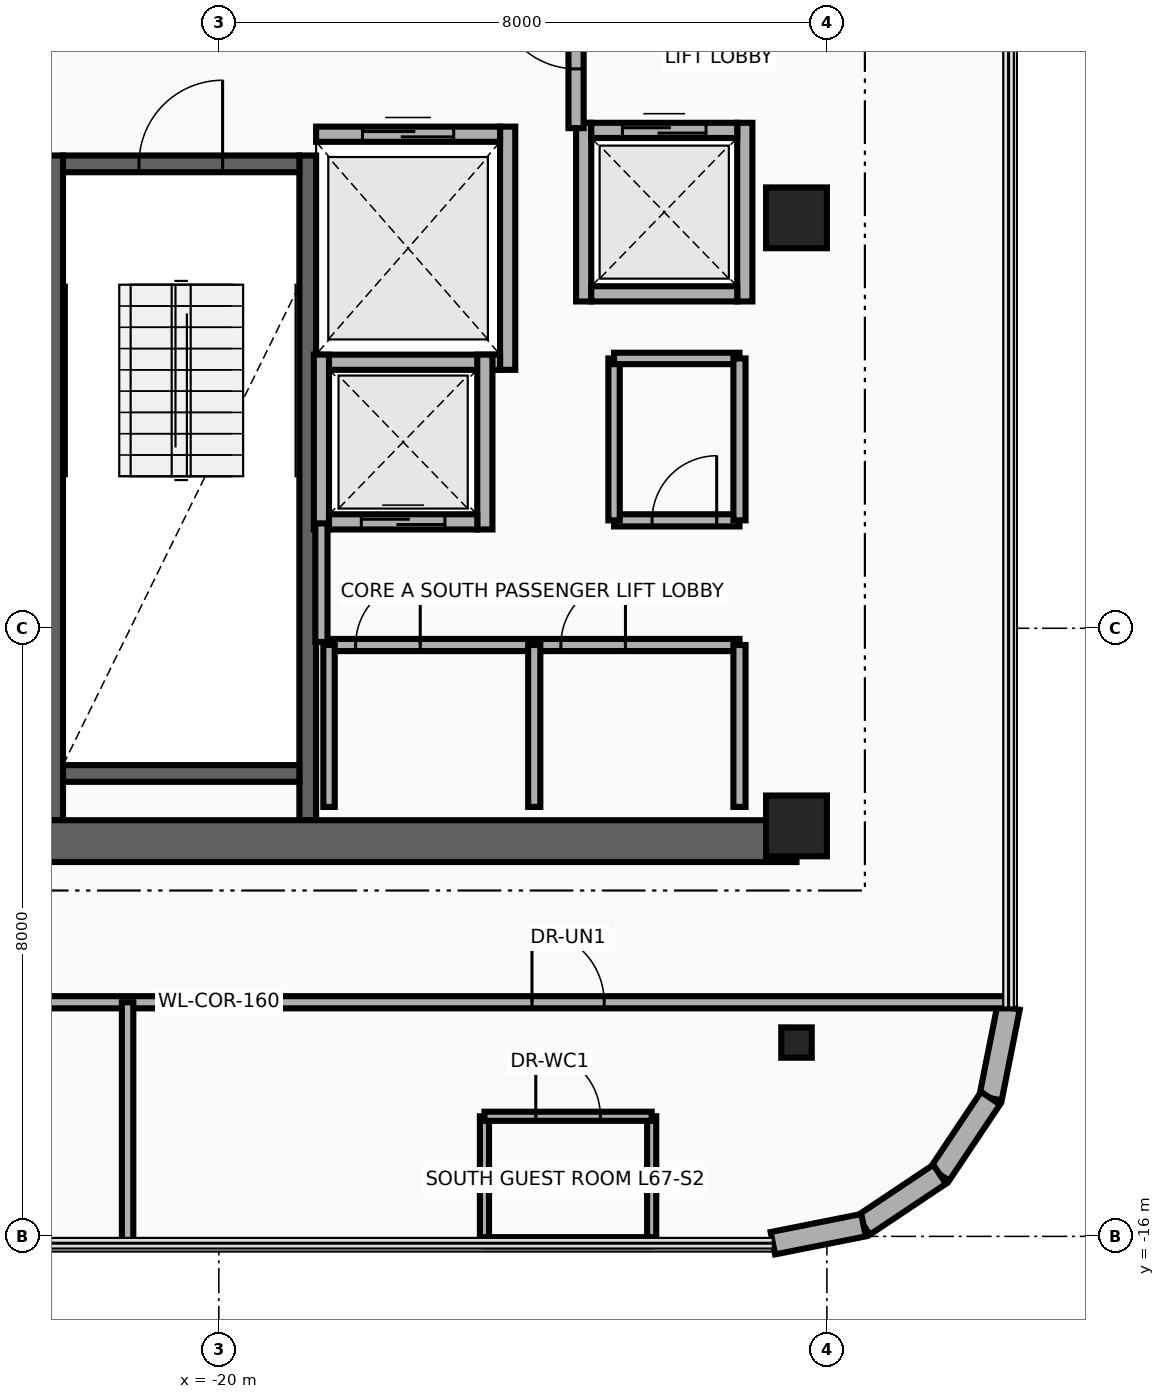
"""IFC4 building model, lengths in metres.
Left out: names, types, materials, properties, quantities, classifications, styles, units other than length and angle.
Written with IfcOpenShell. Run it as: python <this file> out.ifc"""

import sys

from ifc_helpers import new_model, si_unit, direction, frame, frame_2d, origin, origin_2d, place, context, subcontext, project, spatial, rectangle, i_section, extrude, source, transform, mapped, element, fill, save


model = new_model("IFC4")
c1 = context("Model", 3, precision=1e-05, world=origin(), true_north=direction((0.0, 1.0)))
c2 = subcontext(c1, "Body", "Model", "MODEL_VIEW")
j1 = project(units=[si_unit("LENGTHUNIT", "METRE"), si_unit("PLANEANGLEUNIT", "RADIAN")], contexts=[c1])
p1 = place(None, origin())
s1 = spatial("IfcSite", under=j1, at=p1, CompositionType="ELEMENT")
p2 = place(p1, origin())
s2 = spatial("IfcBuilding", under=s1, at=p2, CompositionType="ELEMENT")
p3 = place(p2, frame((0.0, 0.0, 258.0)))
s3 = spatial("IfcBuildingStorey", under=s2, at=p3, CompositionType="ELEMENT", Elevation=258.0)
for number, where, z_axis, x_axis in (
    (1, (-22.16, -10.525, 0.0), (0.0, 0.0, 1.0), (0.0, 1.0, 0.0)),
    (2, (-18.83, -10.525, 0.0), (0.0, 0.0, 1.0), (0.0, 1.0, 0.0)),
):
    element("IfcWall", number, at=place(p3, frame(where, z_axis=z_axis, x_axis=x_axis)), inside=s3, PredefinedType="SHEAR", context=c2, shape_type="SweptSolid", body=[
        extrude(rectangle(XDim=8.745, YDim=0.22, at=frame_2d((4.373, 0.0))), origin(), (0.0, 0.0, 1.0), 3.26),
    ])
p4 = place(p3, frame((-22.05, -9.91, 0.0), z_axis=(0.0, 0.0, 1.0), x_axis=(1.0, 0.0, 0.0)))
e3 = element("IfcWall", 3, at=p4, inside=s3, PredefinedType="SHEAR", context=c2, shape_type="SweptSolid", body=[
    extrude(rectangle(XDim=3.11, YDim=0.22, at=frame_2d((1.555, 0.0))), origin(), (0.0, 0.0, 1.0), 3.26),
])
p5 = place(p3, frame((-22.05, -1.89, 0.0), z_axis=(0.0, 0.0, 1.0), x_axis=(1.0, 0.0, 0.0)))
e4 = element("IfcWall", 4, at=p5, inside=s3, PredefinedType="SHEAR", context=c2, shape_type="SweptSolid", body=[
    extrude(rectangle(XDim=3.11, YDim=0.22, at=frame_2d((1.555, 0.0))), origin(), (0.0, 0.0, 1.0), 3.26),
])
p6 = place(p5, frame((1.0, 0.0, 0.0)))
e5 = element("IfcOpeningElement", 5, at=p6, cuts=e4, PredefinedType="OPENING", context=c2, shape_type="SweptSolid", body=[
    extrude(rectangle(XDim=1.1, YDim=2.15, at=frame_2d((0.55, 1.075))), frame((0.0, 0.125, 0.0), z_axis=(0.0, -1.0, 0.0), x_axis=(1.0, 0.0, 0.0)), (0.0, 0.0, 1.0), 0.25),
])
p7 = place(p3, frame((-22.65, -10.8, 0.0), z_axis=(0.0, 0.0, 1.0), x_axis=(1.0, 0.0, 0.0)))
e6 = element("IfcWall", 6, at=p7, inside=s3, PredefinedType="SHEAR", context=c2, shape_type="SweptSolid", body=[
    extrude(rectangle(XDim=10.25, YDim=0.55, at=frame_2d((5.125, 0.0))), origin(), (0.0, 0.0, 1.0), 3.26),
])
m1 = source(origin(), c2, "Body", "SweptSolid", [
    extrude(rectangle(XDim=0.8, YDim=0.8, at=origin_2d()), origin(), (0.0, 0.0, 1.0), 3.5),
])
for number, where, z_axis, x_axis in (
    (7, (-12.4, -10.6, 0.0), (0.0, 0.0, 1.0), (1.0, 0.0, 0.0)),
    (8, (-12.4, -2.6, 0.0), (0.0, 0.0, 1.0), (1.0, 0.0, 0.0)),
):
    element("IfcColumn", number, at=place(p3, frame(where, z_axis=z_axis, x_axis=x_axis)), inside=s3, PredefinedType="COLUMN", context=c2, shape_type="MappedRepresentation", body=[
        mapped(m1, transform((0.0, 0.0, 0.0), x_axis=(1.0, 0.0, 0.0), y_axis=(0.0, 1.0, 0.0), z_axis=(0.0, 0.0, 1.0), scale=1.0)),
    ])
m2 = source(origin(), c2, "Body", "SweptSolid", [
    extrude(i_section(OverallWidth=0.401, OverallDepth=0.399, WebThickness=0.025, FlangeThickness=0.04, at=origin_2d()), origin(), (0.0, 0.0, 1.0), 3.5),
])
p8 = place(p3, frame((-12.4, -13.45, 0.0), z_axis=(0.0, 0.0, 1.0), x_axis=(1.0, 0.0, 0.0)))
e9 = element("IfcColumn", 9, at=p8, inside=s3, PredefinedType="COLUMN", context=c2, shape_type="MappedRepresentation", body=[
    mapped(m2, transform((0.0, 0.0, 0.0), x_axis=(1.0, 0.0, 0.0), y_axis=(0.0, 1.0, 0.0), z_axis=(0.0, 0.0, 1.0), scale=1.0)),
])
p9 = place(p3, frame((-9.61, -12.989, 0.0), z_axis=(0.0, 0.0, 1.0), x_axis=(-0.194996050505, -0.980804027463, 0.0)))
e10 = element("IfcWall", 10, at=p9, inside=s3, PredefinedType="SOLIDWALL", context=c2, shape_type="SweptSolid", body=[
    extrude(rectangle(XDim=1.216, YDim=0.3, at=frame_2d((0.608, 0.0))), origin(), (0.0, 0.0, 1.0), 3.26),
])
for number, where, z_axis, x_axis in (
    (11, (-9.847, -14.182, 0.0), (0.0, 0.0, 1.0), (-0.556, -0.831, 0.0)),
    (12, (-10.517, -15.183, 0.0), (0.0, 0.0, 1.0), (-0.831, -0.556, 0.0)),
):
    element("IfcWall", number, at=place(p3, frame(where, z_axis=z_axis, x_axis=x_axis)), inside=s3, PredefinedType="SOLIDWALL", context=c2, shape_type="SweptSolid", body=[
        extrude(rectangle(XDim=1.205, YDim=0.3, at=frame_2d((0.603, 0.0))), origin(), (0.0, 0.0, 1.0), 3.26),
    ])
p10 = place(p3, frame((-11.518, -15.853, 0.0), z_axis=(0.0, 0.0, 1.0), x_axis=(-0.980765602568, -0.195189223115, 0.0)))
e13 = element("IfcWall", 13, at=p10, inside=s3, PredefinedType="SOLIDWALL", context=c2, shape_type="SweptSolid", body=[
    extrude(rectangle(XDim=1.216, YDim=0.3, at=frame_2d((0.608, 0.0))), origin(), (0.0, 0.0, 1.0), 3.26),
])
p11 = place(p3, frame((-16.2, -4.6, 0.0), z_axis=(0.0, 0.0, 1.0), x_axis=(0.0, 1.0, 0.0)))
e14 = element("IfcWall", 14, at=p11, inside=s3, PredefinedType="MOVABLE", context=c2, shape_type="SweptSolid", body=[
    extrude(rectangle(XDim=3.2, YDim=0.2, at=frame_2d((1.6, 0.0))), origin(), (0.0, 0.0, 1.0), 3.26),
])
p12 = place(p3, frame((-18.72, -4.5, 0.0), z_axis=(0.0, 0.0, 1.0), x_axis=(1.0, 0.0, 0.0)))
e15 = element("IfcWall", 15, at=p12, inside=s3, PredefinedType="MOVABLE", context=c2, shape_type="SweptSolid", body=[
    extrude(rectangle(XDim=2.42, YDim=0.2, at=frame_2d((1.21, 0.0))), origin(), (0.0, 0.0, 1.0), 3.26),
])
p13 = place(p3, frame((-18.72, -1.5, 0.0), z_axis=(0.0, 0.0, 1.0), x_axis=(1.0, 0.0, 0.0)))
e16 = element("IfcWall", 16, at=p13, inside=s3, PredefinedType="MOVABLE", context=c2, shape_type="SweptSolid", body=[
    extrude(rectangle(XDim=2.42, YDim=0.2, at=frame_2d((1.21, 0.0))), origin(), (0.0, 0.0, 1.0), 3.26),
])
p14 = place(p13, frame((0.61, 0.0, 0.0)))
e17 = element("IfcOpeningElement", 17, at=p14, cuts=e16, PredefinedType="OPENING", context=c2, shape_type="SweptSolid", body=[
    extrude(rectangle(XDim=1.2, YDim=2.1, at=frame_2d((0.6, 1.05))), frame((0.0, 0.115, 0.0), z_axis=(0.0, -1.0, 0.0), x_axis=(1.0, 0.0, 0.0)), (0.0, 0.0, 1.0), 0.23),
])
for number, where, z_axis, x_axis in (
    (18, (-18.65, -6.7, 0.0), (0.0, 0.0, 1.0), (0.0, 1.0, 0.0)),
    (19, (-16.5, -6.7, 0.0), (0.0, 0.0, 1.0), (0.0, 1.0, 0.0)),
):
    element("IfcWall", number, at=place(p3, frame(where, z_axis=z_axis, x_axis=x_axis)), inside=s3, PredefinedType="MOVABLE", context=c2, shape_type="SweptSolid", body=[
        extrude(rectangle(XDim=2.3, YDim=0.2, at=frame_2d((1.15, 0.0))), origin(), (0.0, 0.0, 1.0), 3.26),
    ])
p15 = place(p3, frame((-18.55, -6.6, 0.0), z_axis=(0.0, 0.0, 1.0), x_axis=(1.0, 0.0, 0.0)))
e20 = element("IfcWall", 20, at=p15, inside=s3, PredefinedType="MOVABLE", context=c2, shape_type="SweptSolid", body=[
    extrude(rectangle(XDim=1.95, YDim=0.2, at=frame_2d((0.975, 0.0))), origin(), (0.0, 0.0, 1.0), 3.26),
])
p16 = place(p15, frame((0.425, 0.0, 0.0)))
e21 = element("IfcOpeningElement", 21, at=p16, cuts=e20, PredefinedType="OPENING", context=c2, shape_type="SweptSolid", body=[
    extrude(rectangle(XDim=1.1, YDim=2.1, at=frame_2d((0.55, 1.05))), frame((0.0, 0.115, 0.0), z_axis=(0.0, -1.0, 0.0), x_axis=(1.0, 0.0, 0.0)), (0.0, 0.0, 1.0), 0.23),
])
for number, where, z_axis, x_axis in (
    (22, (-15.2, -3.7, 0.0), (0.0, 0.0, 1.0), (0.0, 1.0, 0.0)),
    (23, (-13.08, -3.7, 0.0), (0.0, 0.0, 1.0), (0.0, 1.0, 0.0)),
):
    element("IfcWall", number, at=place(p3, frame(where, z_axis=z_axis, x_axis=x_axis)), inside=s3, PredefinedType="MOVABLE", context=c2, shape_type="SweptSolid", body=[
        extrude(rectangle(XDim=2.35, YDim=0.2, at=frame_2d((1.175, 0.0))), origin(), (0.0, 0.0, 1.0), 3.26),
    ])
p17 = place(p3, frame((-15.1, -3.6, 0.0), z_axis=(0.0, 0.0, 1.0), x_axis=(1.0, 0.0, 0.0)))
e24 = element("IfcWall", 24, at=p17, inside=s3, PredefinedType="MOVABLE", context=c2, shape_type="SweptSolid", body=[
    extrude(rectangle(XDim=1.92, YDim=0.2, at=frame_2d((0.96, 0.0))), origin(), (0.0, 0.0, 1.0), 3.26),
])
p18 = place(p3, frame((-15.1, -1.45, 0.0), z_axis=(0.0, 0.0, 1.0), x_axis=(1.0, 0.0, 0.0)))
e25 = element("IfcWall", 25, at=p18, inside=s3, PredefinedType="MOVABLE", context=c2, shape_type="SweptSolid", body=[
    extrude(rectangle(XDim=1.92, YDim=0.2, at=frame_2d((0.96, 0.0))), origin(), (0.0, 0.0, 1.0), 3.26),
])
p19 = place(p18, frame((0.41, 0.0, 0.0)))
e26 = element("IfcOpeningElement", 26, at=p19, cuts=e25, PredefinedType="OPENING", context=c2, shape_type="SweptSolid", body=[
    extrude(rectangle(XDim=1.1, YDim=2.1, at=frame_2d((0.55, 1.05))), frame((0.0, 0.115, 0.0), z_axis=(0.0, -1.0, 0.0), x_axis=(1.0, 0.0, 0.0)), (0.0, 0.0, 1.0), 0.23),
])
p20 = place(p3, frame((-15.3, -1.42, 0.0), z_axis=(0.0, 0.0, 1.0), x_axis=(0.0, 1.0, 0.0)))
e27 = element("IfcWall", 27, at=p20, inside=s3, PredefinedType="PARTITIONING", context=c2, shape_type="SweptSolid", body=[
    extrude(rectangle(XDim=2.67, YDim=0.2, at=frame_2d((1.335, 0.0))), origin(), (0.0, 0.0, 1.0), 3.26),
])
p21 = place(p20, frame((0.78, 0.0, 0.0)))
e28 = element("IfcOpeningElement", 28, at=p21, cuts=e27, PredefinedType="OPENING", context=c2, shape_type="SweptSolid", body=[
    extrude(rectangle(XDim=1.05, YDim=2.15, at=frame_2d((0.525, 1.075))), frame((0.0, 0.115, 0.0), z_axis=(0.0, -1.0, 0.0), x_axis=(1.0, 0.0, 0.0)), (0.0, 0.0, 1.0), 0.23),
])
p22 = place(p3, frame((-18.65, -8.18, 0.0), z_axis=(0.0, 0.0, 1.0), x_axis=(0.0, 1.0, 0.0)))
e29 = element("IfcWall", 29, at=p22, inside=s3, PredefinedType="PARTITIONING", context=c2, shape_type="SweptSolid", body=[
    extrude(rectangle(XDim=1.56, YDim=0.16, at=frame_2d((0.78, 0.0))), origin(), (0.0, 0.0, 1.0), 3.26),
])
p23 = place(p3, frame((-18.55, -8.22, 0.0), z_axis=(0.0, 0.0, 1.0), x_axis=(1.0, 0.0, 0.0)))
e30 = element("IfcWall", 30, at=p23, inside=s3, PredefinedType="PARTITIONING", context=c2, shape_type="SweptSolid", body=[
    extrude(rectangle(XDim=5.4, YDim=0.16, at=frame_2d((2.7, 0.0))), origin(), (0.0, 0.0, 1.0), 3.26),
])
p24 = place(p23, frame((0.35, 0.0, 0.0)))
e31 = element("IfcOpeningElement", 31, at=p24, cuts=e30, PredefinedType="OPENING", context=c2, shape_type="SweptSolid", body=[
    extrude(rectangle(XDim=0.85, YDim=2.05, at=frame_2d((0.425, 1.025))), frame((0.0, 0.095, 0.0), z_axis=(0.0, -1.0, 0.0), x_axis=(1.0, 0.0, 0.0)), (0.0, 0.0, 1.0), 0.19),
])
p25 = place(p23, frame((3.05, 0.0, 0.0)))
e32 = element("IfcOpeningElement", 32, at=p25, cuts=e30, PredefinedType="OPENING", context=c2, shape_type="SweptSolid", body=[
    extrude(rectangle(XDim=0.85, YDim=2.05, at=frame_2d((0.425, 1.025))), frame((0.0, 0.095, 0.0), z_axis=(0.0, -1.0, 0.0), x_axis=(1.0, 0.0, 0.0)), (0.0, 0.0, 1.0), 0.19),
])
p26 = place(p3, frame((-18.55, -10.35, 0.0), z_axis=(0.0, 0.0, 1.0), x_axis=(0.0, 1.0, 0.0)))
e33 = element("IfcWall", 33, at=p26, inside=s3, PredefinedType="PARTITIONING", context=c2, shape_type="SweptSolid", body=[
    extrude(rectangle(XDim=2.13, YDim=0.15, at=frame_2d((1.065, 0.0))), origin(), (0.0, 0.0, 1.0), 3.26),
])
for number, where, z_axis, x_axis in (
    (34, (-13.15, -10.35, 0.0), (0.0, 0.0, 1.0), (0.0, 1.0, 0.0)),
    (35, (-15.85, -10.35, 0.0), (0.0, 0.0, 1.0), (0.0, 1.0, 0.0)),
):
    element("IfcWall", number, at=place(p3, frame(where, z_axis=z_axis, x_axis=x_axis)), inside=s3, PredefinedType="PARTITIONING", context=c2, shape_type="SweptSolid", body=[
        extrude(rectangle(XDim=2.13, YDim=0.16, at=frame_2d((1.065, 0.0))), origin(), (0.0, 0.0, 1.0), 3.26),
    ])
p27 = place(p3, frame((-14.8, -6.58, 0.0), z_axis=(0.0, 0.0, 1.0), x_axis=(1.0, 0.0, 0.0)))
e36 = element("IfcWall", 36, at=p27, inside=s3, PredefinedType="PARTITIONING", context=c2, shape_type="SweptSolid", body=[
    extrude(rectangle(XDim=1.65, YDim=0.16, at=frame_2d((0.825, 0.0))), origin(), (0.0, 0.0, 1.0), 3.26),
])
p28 = place(p27, frame((0.5, 0.0, 0.0)))
e37 = element("IfcOpeningElement", 37, at=p28, cuts=e36, PredefinedType="OPENING", context=c2, shape_type="SweptSolid", body=[
    extrude(rectangle(XDim=0.85, YDim=2.05, at=frame_2d((0.425, 1.025))), frame((0.0, 0.095, 0.0), z_axis=(0.0, -1.0, 0.0), x_axis=(1.0, 0.0, 0.0)), (0.0, 0.0, 1.0), 0.19),
])
p29 = place(p3, frame((-14.8, -6.58, 0.0), z_axis=(0.0, 0.0, 1.0), x_axis=(0.0, 1.0, 0.0)))
e38 = element("IfcWall", 38, at=p29, inside=s3, PredefinedType="PARTITIONING", context=c2, shape_type="SweptSolid", body=[
    extrude(rectangle(XDim=2.13, YDim=0.15, at=frame_2d((1.065, 0.0))), origin(), (0.0, 0.0, 1.0), 3.26),
])
p30 = place(p3, frame((-14.8, -4.45, 0.0), z_axis=(0.0, 0.0, 1.0), x_axis=(1.0, 0.0, 0.0)))
e39 = element("IfcWall", 39, at=p30, inside=s3, PredefinedType="PARTITIONING", context=c2, shape_type="SweptSolid", body=[
    extrude(rectangle(XDim=1.65, YDim=0.15, at=frame_2d((0.825, 0.0))), origin(), (0.0, 0.0, 1.0), 3.26),
])
p31 = place(p3, frame((-13.15, -6.58, 0.0), z_axis=(0.0, 0.0, 1.0), x_axis=(0.0, 1.0, 0.0)))
e40 = element("IfcWall", 40, at=p31, inside=s3, PredefinedType="PARTITIONING", context=c2, shape_type="SweptSolid", body=[
    extrude(rectangle(XDim=2.13, YDim=0.16, at=frame_2d((1.065, 0.0))), origin(), (0.0, 0.0, 1.0), 3.26),
])
p32 = place(p3, frame((-30.39, -12.92, 0.0), z_axis=(0.0, 0.0, 1.0), x_axis=(1.0, 0.0, 0.0)))
e41 = element("IfcWall", 41, at=p32, inside=s3, PredefinedType="PARTITIONING", context=c2, shape_type="SweptSolid", body=[
    extrude(rectangle(XDim=20.78, YDim=0.16, at=frame_2d((10.39, 0.0))), origin(), (0.0, 0.0, 1.0), 2.634),
])
p33 = place(p32, frame((5.22, 0.0, 0.0)))
e42 = element("IfcOpeningElement", 42, at=p33, cuts=e41, PredefinedType="OPENING", context=c2, shape_type="SweptSolid", body=[
    extrude(rectangle(XDim=0.95, YDim=2.15, at=frame_2d((0.475, 1.075))), frame((0.0, 0.095, 0.0), z_axis=(0.0, -1.0, 0.0), x_axis=(1.0, 0.0, 0.0)), (0.0, 0.0, 1.0), 0.19),
])
p34 = place(p32, frame((14.51, 0.0, 0.0)))
e43 = element("IfcOpeningElement", 43, at=p34, cuts=e41, PredefinedType="OPENING", context=c2, shape_type="SweptSolid", body=[
    extrude(rectangle(XDim=0.95, YDim=2.15, at=frame_2d((0.475, 1.075))), frame((0.0, 0.095, 0.0), z_axis=(0.0, -1.0, 0.0), x_axis=(1.0, 0.0, 0.0)), (0.0, 0.0, 1.0), 0.19),
])
p35 = place(p3, frame((-21.2, -16.09, 0.0), z_axis=(0.0, 0.0, 1.0), x_axis=(0.0, 1.0, 0.0)))
e44 = element("IfcWall", 44, at=p35, inside=s3, PredefinedType="PARTITIONING", context=c2, shape_type="SweptSolid", body=[
    extrude(rectangle(XDim=3.17, YDim=0.15, at=frame_2d((1.585, 0.0))), origin(), (0.0, 0.0, 1.0), 2.706),
])
for number, where, z_axis, x_axis in (
    (45, (-16.505, -16.07, 0.0), (0.0, 0.0, 1.0), (0.0, 1.0, 0.0)),
    (46, (-14.305, -16.07, 0.0), (0.0, 0.0, 1.0), (0.0, 1.0, 0.0)),
):
    element("IfcWall", number, at=place(p3, frame(where, z_axis=z_axis, x_axis=x_axis)), inside=s3, PredefinedType="PARTITIONING", context=c2, shape_type="SweptSolid", body=[
        extrude(rectangle(XDim=1.65, YDim=0.12, at=frame_2d((0.825, 0.0))), origin(), (0.0, 0.0, 1.0), 3.26),
    ])
p36 = place(p3, frame((-16.505, -16.07, 0.0), z_axis=(0.0, 0.0, 1.0), x_axis=(1.0, 0.0, 0.0)))
e47 = element("IfcWall", 47, at=p36, inside=s3, PredefinedType="PARTITIONING", context=c2, shape_type="SweptSolid", body=[
    extrude(rectangle(XDim=2.2, YDim=0.12, at=frame_2d((1.1, 0.0))), origin(), (0.0, 0.0, 1.0), 3.26),
])
p37 = place(p3, frame((-16.505, -14.42, 0.0), z_axis=(0.0, 0.0, 1.0), x_axis=(1.0, 0.0, 0.0)))
e48 = element("IfcWall", 48, at=p37, inside=s3, PredefinedType="PARTITIONING", context=c2, shape_type="SweptSolid", body=[
    extrude(rectangle(XDim=2.2, YDim=0.12, at=frame_2d((1.1, 0.0))), origin(), (0.0, 0.0, 1.0), 3.26),
])
p38 = place(p37, frame((0.675, 0.0, 0.0)))
e49 = element("IfcOpeningElement", 49, at=p38, cuts=e48, PredefinedType="OPENING", context=c2, shape_type="SweptSolid", body=[
    extrude(rectangle(XDim=0.85, YDim=2.1, at=frame_2d((0.425, 1.05))), frame((0.0, 0.075, 0.0), z_axis=(0.0, -1.0, 0.0), x_axis=(1.0, 0.0, 0.0)), (0.0, 0.0, 1.0), 0.15),
])
p39 = place(p14, origin())
e50 = element("IfcDoor", 50, at=p39, inside=s3, OperationType="DOUBLE_DOOR_SLIDING", PredefinedType="DOOR", context=c2, shape_type="SweptSolid", body=[
    extrude(rectangle(XDim=1.2, YDim=2.1, at=frame_2d((0.6, 1.05))), frame((0.0, 0.025, 0.0), z_axis=(0.0, -1.0, 0.0), x_axis=(1.0, 0.0, 0.0)), (0.0, 0.0, 1.0), 0.05),
])
fill(e17, e50)
p40 = place(p16, origin())
e51 = element("IfcDoor", 51, at=p40, inside=s3, OperationType="DOUBLE_DOOR_SLIDING", PredefinedType="DOOR", context=c2, shape_type="SweptSolid", body=[
    extrude(rectangle(XDim=1.1, YDim=2.1, at=frame_2d((0.55, 1.05))), frame((0.0, 0.025, 0.0), z_axis=(0.0, -1.0, 0.0), x_axis=(1.0, 0.0, 0.0)), (0.0, 0.0, 1.0), 0.05),
])
fill(e21, e51)
p41 = place(p19, origin())
e52 = element("IfcDoor", 52, at=p41, inside=s3, OperationType="DOUBLE_DOOR_SLIDING", PredefinedType="DOOR", context=c2, shape_type="SweptSolid", body=[
    extrude(rectangle(XDim=1.1, YDim=2.1, at=frame_2d((0.55, 1.05))), frame((0.0, 0.025, 0.0), z_axis=(0.0, -1.0, 0.0), x_axis=(1.0, 0.0, 0.0)), (0.0, 0.0, 1.0), 0.05),
])
fill(e26, e52)
p42 = place(p21, origin())
e53 = element("IfcDoor", 53, at=p42, inside=s3, OperationType="SINGLE_SWING_RIGHT", PredefinedType="DOOR", context=c2, shape_type="SweptSolid", body=[
    extrude(rectangle(XDim=1.05, YDim=2.15, at=frame_2d((0.525, 1.075))), frame((0.0, 0.025, 0.0), z_axis=(0.0, -1.0, 0.0), x_axis=(1.0, 0.0, 0.0)), (0.0, 0.0, 1.0), 0.05),
])
fill(e28, e53)
p43 = place(p6, origin())
e54 = element("IfcDoor", 54, at=p43, inside=s3, OperationType="SINGLE_SWING_RIGHT", PredefinedType="DOOR", context=c2, shape_type="SweptSolid", body=[
    extrude(rectangle(XDim=1.1, YDim=2.15, at=frame_2d((0.55, 1.075))), frame((0.0, 0.025, 0.0), z_axis=(0.0, -1.0, 0.0), x_axis=(1.0, 0.0, 0.0)), (0.0, 0.0, 1.0), 0.05),
])
fill(e5, e54)
p44 = place(p24, origin())
e55 = element("IfcDoor", 55, at=p44, inside=s3, OperationType="SINGLE_SWING_LEFT", PredefinedType="DOOR", context=c2, shape_type="SweptSolid", body=[
    extrude(rectangle(XDim=0.85, YDim=2.05, at=frame_2d((0.425, 1.025))), frame((0.0, 0.025, 0.0), z_axis=(0.0, -1.0, 0.0), x_axis=(1.0, 0.0, 0.0)), (0.0, 0.0, 1.0), 0.05),
])
fill(e31, e55)
p45 = place(p25, origin())
e56 = element("IfcDoor", 56, at=p45, inside=s3, OperationType="SINGLE_SWING_RIGHT", PredefinedType="DOOR", context=c2, shape_type="SweptSolid", body=[
    extrude(rectangle(XDim=0.85, YDim=2.05, at=frame_2d((0.425, 1.025))), frame((0.0, 0.025, 0.0), z_axis=(0.0, -1.0, 0.0), x_axis=(1.0, 0.0, 0.0)), (0.0, 0.0, 1.0), 0.05),
])
fill(e32, e56)
p46 = place(p28, origin())
e57 = element("IfcDoor", 57, at=p46, inside=s3, OperationType="SINGLE_SWING_LEFT", PredefinedType="DOOR", context=c2, shape_type="SweptSolid", body=[
    extrude(rectangle(XDim=0.85, YDim=2.05, at=frame_2d((0.425, 1.025))), frame((0.0, 0.025, 0.0), z_axis=(0.0, -1.0, 0.0), x_axis=(1.0, 0.0, 0.0)), (0.0, 0.0, 1.0), 0.05),
])
fill(e37, e57)
p47 = place(p34, origin())
e58 = element("IfcDoor", 58, at=p47, inside=s3, OperationType="SINGLE_SWING_RIGHT", PredefinedType="DOOR", context=c2, shape_type="SweptSolid", body=[
    extrude(rectangle(XDim=0.95, YDim=2.15, at=frame_2d((0.475, 1.075))), frame((0.0, 0.025, 0.0), z_axis=(0.0, -1.0, 0.0), x_axis=(1.0, 0.0, 0.0)), (0.0, 0.0, 1.0), 0.05),
])
fill(e43, e58)
p48 = place(p38, origin())
e59 = element("IfcDoor", 59, at=p48, inside=s3, OperationType="SINGLE_SWING_LEFT", PredefinedType="DOOR", context=c2, shape_type="SweptSolid", body=[
    extrude(rectangle(XDim=0.85, YDim=2.1, at=frame_2d((0.425, 1.05))), frame((0.0, 0.025, 0.0), z_axis=(0.0, -1.0, 0.0), x_axis=(1.0, 0.0, 0.0)), (0.0, 0.0, 1.0), 0.05),
])
fill(e49, e59)
save(model, sys.argv[1])
